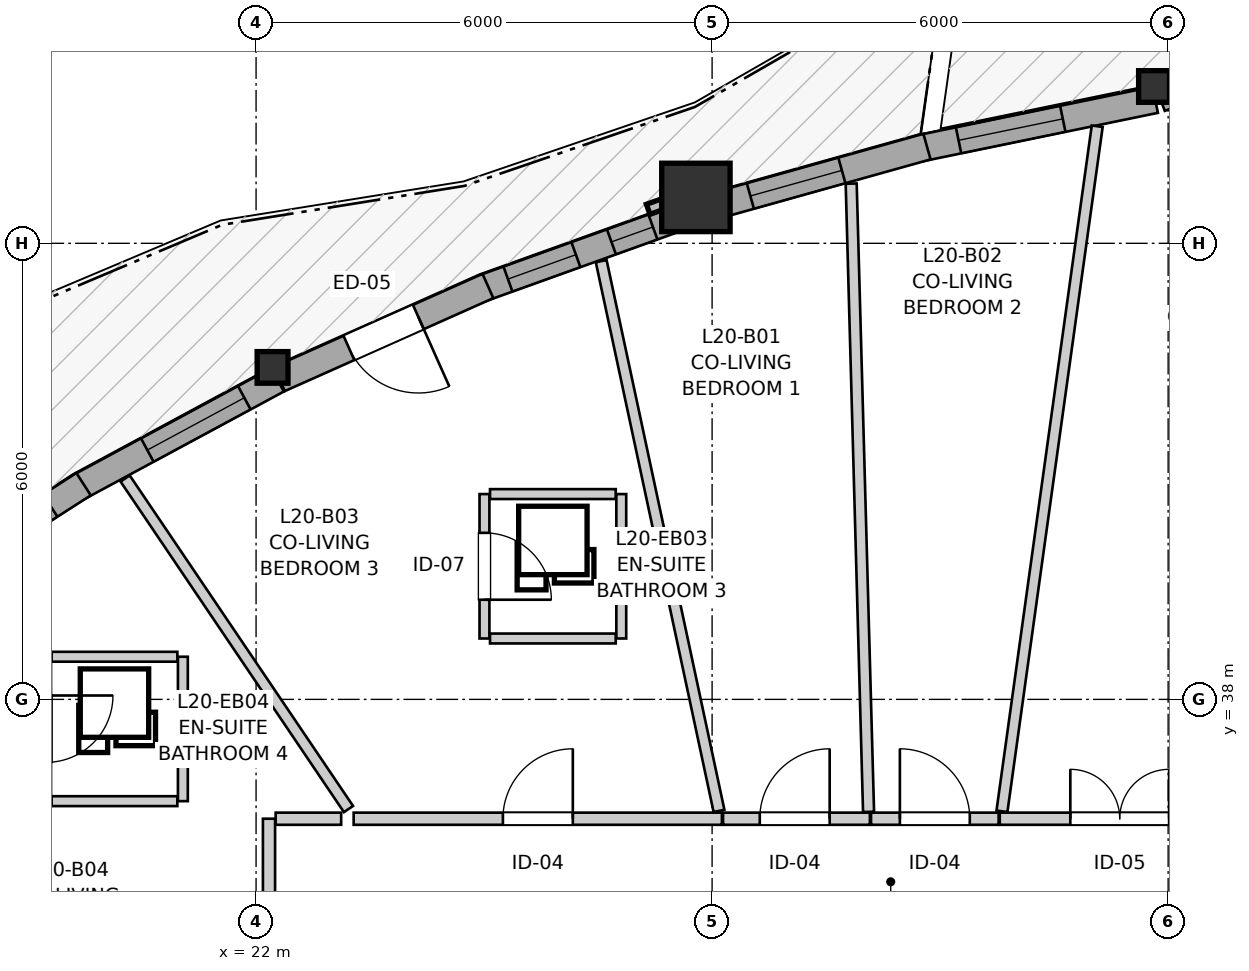
"""IFC4 building model, lengths in metres.
Left out: names, types, materials, properties, quantities, classifications, styles, units other than length and angle.
Written with IfcOpenShell. Run it as: python <this file> out.ifc"""

import sys

from ifc_helpers import new_model, si_unit, direction, frame, frame_2d, origin, origin_2d, place, context, subcontext, project, spatial, rectangle, i_section, extrude, source, transform, mapped, element, fill, save


model = new_model("IFC4")
c1 = context("Model", 3, precision=1e-05, world=origin(), true_north=direction((0.0, 1.0)))
c2 = subcontext(c1, "Body", "Model", "MODEL_VIEW")
j1 = project(units=[si_unit("LENGTHUNIT", "METRE"), si_unit("PLANEANGLEUNIT", "RADIAN")], contexts=[c1])
p1 = place(None, origin())
s1 = spatial("IfcSite", under=j1, at=p1, CompositionType="ELEMENT")
p2 = place(p1, origin())
s2 = spatial("IfcBuilding", under=s1, at=p2, CompositionType="ELEMENT")
p3 = place(p2, frame((0.0, 0.0, 70.4)))
s3 = spatial("IfcBuildingStorey", under=s2, at=p3, CompositionType="ELEMENT", Elevation=70.4)
m1 = source(origin(), c2, "Body", "SweptSolid", [
    extrude(i_section(OverallWidth=0.406, OverallDepth=0.416, WebThickness=0.027, FlangeThickness=0.044, FilletRadius=0.015, at=origin_2d()), origin(), (0.0, 0.0, 1.0), 2.95),
])
p4 = place(p3, frame((33.815, 46.063, 0.0), z_axis=(0.0, 0.0, 1.0), x_axis=(1.0, 0.0, 0.0)))
e1 = element("IfcColumn", 1, at=p4, inside=s3, PredefinedType="PILASTER", context=c2, shape_type="MappedRepresentation", body=[
    mapped(m1, transform((0.0, 0.0, 0.0), x_axis=(1.0, 0.0, 0.0), y_axis=(0.0, 1.0, 0.0), z_axis=(0.0, 0.0, 1.0), scale=1.0)),
])
m2 = source(origin(), c2, "Body", "SweptSolid", [
    extrude(rectangle(XDim=0.9, YDim=0.9, at=origin_2d()), origin(), (0.0, 0.0, 1.0), 2.95),
])
p5 = place(p3, frame((27.787, 44.604, 0.0), z_axis=(0.0, 0.0, 1.0), x_axis=(1.0, 0.0, 0.0)))
e2 = element("IfcColumn", 2, at=p5, inside=s3, PredefinedType="COLUMN", context=c2, shape_type="MappedRepresentation", body=[
    mapped(m2, transform((0.0, 0.0, 0.0), x_axis=(1.0, 0.0, 0.0), y_axis=(0.0, 1.0, 0.0), z_axis=(0.0, 0.0, 1.0), scale=1.0)),
])
p6 = place(p3, frame((22.217, 42.367, 0.0), z_axis=(0.0, 0.0, 1.0), x_axis=(1.0, 0.0, 0.0)))
e3 = element("IfcColumn", 3, at=p6, inside=s3, PredefinedType="PILASTER", context=c2, shape_type="MappedRepresentation", body=[
    mapped(m1, transform((0.0, 0.0, 0.0), x_axis=(1.0, 0.0, 0.0), y_axis=(0.0, 1.0, 0.0), z_axis=(0.0, 0.0, 1.0), scale=1.0)),
])
p7 = place(p3, frame((35.806, 46.62, 0.0), z_axis=(0.0, 0.0, 1.0), x_axis=(-0.936863987578, -0.34969396446, 0.0)))
e4 = element("IfcWall", 4, at=p7, inside=s3, PredefinedType="SOLIDWALL", context=c2, shape_type="SweptSolid", body=[
    extrude(rectangle(XDim=2.041, YDim=0.35, at=frame_2d((1.021, 0.0))), origin(), (0.0, 0.0, 1.0), 2.48),
])
p8 = place(p7, frame((0.265, 0.0, 0.82)))
e5 = element("IfcOpeningElement", 5, at=p8, cuts=e4, PredefinedType="OPENING", context=c2, shape_type="SweptSolid", body=[
    extrude(rectangle(XDim=1.45, YDim=1.25, at=frame_2d((0.725, 0.625))), frame((0.0, 0.185, 0.0), z_axis=(0.0, -1.0, 0.0), x_axis=(1.0, 0.0, 0.0)), (0.0, 0.0, 1.0), 0.37),
])
p9 = place(p3, frame((33.83, 45.888, 0.0), z_axis=(0.0, 0.0, 1.0), x_axis=(-0.979439051097, -0.201740291429, 0.0)))
e6 = element("IfcWall", 6, at=p9, inside=s3, PredefinedType="SOLIDWALL", context=c2, shape_type="SweptSolid", body=[
    extrude(rectangle(XDim=3.154, YDim=0.35, at=frame_2d((1.577, 0.0))), origin(), (0.0, 0.0, 1.0), 2.48),
])
p10 = place(p9, frame((1.242, 0.0, 0.82)))
e7 = element("IfcOpeningElement", 7, at=p10, cuts=e6, PredefinedType="OPENING", context=c2, shape_type="SweptSolid", body=[
    extrude(rectangle(XDim=1.4, YDim=1.35, at=frame_2d((0.7, 0.675))), frame((0.0, 0.185, 0.0), z_axis=(0.0, -1.0, 0.0), x_axis=(1.0, 0.0, 0.0)), (0.0, 0.0, 1.0), 0.37),
])
p11 = place(p3, frame((30.827, 45.272, 0.0), z_axis=(0.0, 0.0, 1.0), x_axis=(-0.963061576901, -0.269281263918, 0.0)))
e8 = element("IfcWall", 8, at=p11, inside=s3, PredefinedType="SOLIDWALL", context=c2, shape_type="SweptSolid", body=[
    extrude(rectangle(XDim=2.883, YDim=0.35, at=frame_2d((1.441, 0.0))), origin(), (0.0, 0.0, 1.0), 2.48),
])
p12 = place(p11, frame((1.163, 0.0, 0.82)))
e9 = element("IfcOpeningElement", 9, at=p12, cuts=e8, PredefinedType="OPENING", context=c2, shape_type="SweptSolid", body=[
    extrude(rectangle(XDim=1.25, YDim=1.35, at=frame_2d((0.625, 0.675))), frame((0.0, 0.185, 0.0), z_axis=(0.0, -1.0, 0.0), x_axis=(1.0, 0.0, 0.0)), (0.0, 0.0, 1.0), 0.37),
])
p13 = place(p3, frame((27.634, 44.363, 0.0), z_axis=(0.0, 0.0, 1.0), x_axis=(-0.941122275829, -0.3380663573, 0.0)))
e10 = element("IfcWall", 10, at=p13, inside=s3, PredefinedType="SOLIDWALL", context=c2, shape_type="SweptSolid", body=[
    extrude(rectangle(XDim=2.833, YDim=0.35, at=frame_2d((1.417, 0.0))), origin(), (0.0, 0.0, 1.0), 2.48),
])
p14 = place(p13, frame((0.439, 0.0, 0.82)))
e11 = element("IfcOpeningElement", 11, at=p14, cuts=e10, PredefinedType="OPENING", context=c2, shape_type="SweptSolid", body=[
    extrude(rectangle(XDim=0.58, YDim=1.35, at=frame_2d((0.29, 0.675))), frame((0.0, 0.185, 0.0), z_axis=(0.0, -1.0, 0.0), x_axis=(1.0, 0.0, 0.0)), (0.0, 0.0, 1.0), 0.37),
])
p15 = place(p13, frame((1.515, 0.0, 0.82)))
e12 = element("IfcOpeningElement", 12, at=p15, cuts=e10, PredefinedType="OPENING", context=c2, shape_type="SweptSolid", body=[
    extrude(rectangle(XDim=0.95, YDim=1.35, at=frame_2d((0.475, 0.675))), frame((0.0, 0.185, 0.0), z_axis=(0.0, -1.0, 0.0), x_axis=(1.0, 0.0, 0.0)), (0.0, 0.0, 1.0), 0.37),
])
p16 = place(p3, frame((25.051, 43.438, 0.0), z_axis=(0.0, 0.0, 1.0), x_axis=(-0.913435824308, -0.406982794318, 0.0)))
e13 = element("IfcWall", 13, at=p16, inside=s3, PredefinedType="SOLIDWALL", context=c2, shape_type="SweptSolid", body=[
    extrude(rectangle(XDim=3.004, YDim=0.35, at=frame_2d((1.502, 0.0))), origin(), (0.0, 0.0, 1.0), 2.48),
])
p17 = place(p16, frame((1.002, 0.0, 0.0)))
e14 = element("IfcOpeningElement", 14, at=p17, cuts=e13, PredefinedType="OPENING", context=c2, shape_type="SweptSolid", body=[
    extrude(rectangle(XDim=1.0, YDim=2.1, at=frame_2d((0.5, 1.05))), frame((0.0, 0.185, 0.0), z_axis=(0.0, -1.0, 0.0), x_axis=(1.0, 0.0, 0.0)), (0.0, 0.0, 1.0), 0.37),
])
p18 = place(p3, frame((22.282, 42.204, 0.0), z_axis=(0.0, 0.0, 1.0), x_axis=(-0.880100783756, -0.474786910553, 0.0)))
e15 = element("IfcWall", 15, at=p18, inside=s3, PredefinedType="SOLIDWALL", context=c2, shape_type="SweptSolid", body=[
    extrude(rectangle(XDim=2.987, YDim=0.35, at=frame_2d((1.494, 0.0))), origin(), (0.0, 0.0, 1.0), 2.48),
])
p19 = place(p18, frame((0.497, 0.0, 0.82)))
e16 = element("IfcOpeningElement", 16, at=p19, cuts=e15, PredefinedType="OPENING", context=c2, shape_type="SweptSolid", body=[
    extrude(rectangle(XDim=1.45, YDim=1.25, at=frame_2d((0.725, 0.625))), frame((0.0, 0.185, 0.0), z_axis=(0.0, -1.0, 0.0), x_axis=(1.0, 0.0, 0.0)), (0.0, 0.0, 1.0), 0.37),
])
p20 = place(p3, frame((19.73, 40.831, 0.0), z_axis=(0.0, 0.0, 1.0), x_axis=(-0.841577423868, -0.540136500929, 0.0)))
e17 = element("IfcWall", 17, at=p20, inside=s3, PredefinedType="SOLIDWALL", context=c2, shape_type="SweptSolid", body=[
    extrude(rectangle(XDim=2.782, YDim=0.35, at=frame_2d((1.391, 0.0))), origin(), (0.0, 0.0, 1.0), 2.48),
])
p21 = place(p20, frame((0.521, 0.0, 0.82)))
e18 = element("IfcOpeningElement", 18, at=p21, cuts=e17, PredefinedType="OPENING", context=c2, shape_type="SweptSolid", body=[
    extrude(rectangle(XDim=1.75, YDim=1.3, at=frame_2d((0.875, 0.65))), frame((0.0, 0.185, 0.0), z_axis=(0.0, -1.0, 0.0), x_axis=(1.0, 0.0, 0.0)), (0.0, 0.0, 1.0), 0.37),
])
p22 = place(p3, frame((23.284, 36.43, 0.0), z_axis=(0.0, 0.0, 1.0), x_axis=(1.0, 0.0, 0.0)))
e19 = element("IfcWall", 19, at=p22, inside=s3, PredefinedType="PARTITIONING", context=c2, shape_type="SweptSolid", body=[
    extrude(rectangle(XDim=4.845, YDim=0.16, at=frame_2d((2.422, 0.0))), origin(), (0.0, 0.0, 1.0), 2.588),
])
p23 = place(p22, frame((1.963, 0.0, 0.0)))
e20 = element("IfcOpeningElement", 20, at=p23, cuts=e19, PredefinedType="OPENING", context=c2, shape_type="SweptSolid", body=[
    extrude(rectangle(XDim=0.92, YDim=2.1, at=frame_2d((0.46, 1.05))), frame((0.0, 0.09, 0.0), z_axis=(0.0, -1.0, 0.0), x_axis=(1.0, 0.0, 0.0)), (0.0, 0.0, 1.0), 0.18),
])
p24 = place(p3, frame((22.17, 31.61, 0.0), z_axis=(0.0, 0.0, 1.0), x_axis=(0.0, 1.0, 0.0)))
e21 = element("IfcWall", 21, at=p24, inside=s3, PredefinedType="PARTITIONING", context=c2, shape_type="SweptSolid", body=[
    extrude(rectangle(XDim=4.82, YDim=0.16, at=frame_2d((2.41, 0.0))), origin(), (0.0, 0.0, 1.0), 2.95),
])
p25 = place(p24, frame((1.959, 0.0, 0.0)))
e22 = element("IfcOpeningElement", 22, at=p25, cuts=e21, PredefinedType="OPENING", context=c2, shape_type="SweptSolid", body=[
    extrude(rectangle(XDim=0.92, YDim=2.1, at=frame_2d((0.46, 1.05))), frame((0.0, 0.09, 0.0), z_axis=(0.0, -1.0, 0.0), x_axis=(1.0, 0.0, 0.0)), (0.0, 0.0, 1.0), 0.18),
])
p26 = place(p3, frame((31.785, 36.43, 0.0), z_axis=(0.0, 0.0, 1.0), x_axis=(1.0, 0.0, 0.0)))
e23 = element("IfcWall", 23, at=p26, inside=s3, PredefinedType="PARTITIONING", context=c2, shape_type="SweptSolid", body=[
    extrude(rectangle(XDim=3.109, YDim=0.16, at=frame_2d((1.555, 0.0))), origin(), (0.0, 0.0, 1.0), 2.95),
])
p27 = place(p26, frame((0.928, 0.0, 0.0)))
e24 = element("IfcOpeningElement", 24, at=p27, cuts=e23, PredefinedType="OPENING", context=c2, shape_type="SweptSolid", body=[
    extrude(rectangle(XDim=1.3, YDim=2.1, at=frame_2d((0.65, 1.05))), frame((0.0, 0.09, 0.0), z_axis=(0.0, -1.0, 0.0), x_axis=(1.0, 0.0, 0.0)), (0.0, 0.0, 1.0), 0.18),
])
p28 = place(p3, frame((28.144, 36.43, 0.0), z_axis=(0.0, 0.0, 1.0), x_axis=(1.0, 0.0, 0.0)))
e25 = element("IfcWall", 25, at=p28, inside=s3, PredefinedType="PARTITIONING", context=c2, shape_type="SweptSolid", body=[
    extrude(rectangle(XDim=1.932, YDim=0.16, at=frame_2d((0.966, 0.0))), origin(), (0.0, 0.0, 1.0), 2.95),
])
p29 = place(p28, frame((0.483, 0.0, 0.0)))
e26 = element("IfcOpeningElement", 26, at=p29, cuts=e25, PredefinedType="OPENING", context=c2, shape_type="SweptSolid", body=[
    extrude(rectangle(XDim=0.92, YDim=2.1, at=frame_2d((0.46, 1.05))), frame((0.0, 0.09, 0.0), z_axis=(0.0, -1.0, 0.0), x_axis=(1.0, 0.0, 0.0)), (0.0, 0.0, 1.0), 0.18),
])
p30 = place(p3, frame((25.005, 40.701, 0.0), z_axis=(0.0, 0.0, 1.0), x_axis=(0.0, -1.0, 0.0)))
e27 = element("IfcWall", 27, at=p30, inside=s3, PredefinedType="PARTITIONING", context=c2, shape_type="SweptSolid", body=[
    extrude(rectangle(XDim=1.9, YDim=0.13, at=frame_2d((0.95, 0.0))), origin(), (0.0, 0.0, 1.0), 2.95),
])
p31 = place(p30, frame((0.51, 0.0, 0.0)))
e28 = element("IfcOpeningElement", 28, at=p31, cuts=e27, PredefinedType="OPENING", context=c2, shape_type="SweptSolid", body=[
    extrude(rectangle(XDim=0.88, YDim=2.05, at=frame_2d((0.44, 1.025))), frame((0.0, 0.075, 0.0), z_axis=(0.0, -1.0, 0.0), x_axis=(1.0, 0.0, 0.0)), (0.0, 0.0, 1.0), 0.15),
])
p32 = place(p3, frame((30.091, 36.43, 0.0), z_axis=(0.0, 0.0, 1.0), x_axis=(1.0, 0.0, 0.0)))
e29 = element("IfcWall", 29, at=p32, inside=s3, PredefinedType="PARTITIONING", context=c2, shape_type="SweptSolid", body=[
    extrude(rectangle(XDim=1.679, YDim=0.16, at=frame_2d((0.839, 0.0))), origin(), (0.0, 0.0, 1.0), 2.95),
])
p33 = place(p32, frame((0.379, 0.0, 0.0)))
e30 = element("IfcOpeningElement", 30, at=p33, cuts=e29, PredefinedType="OPENING", context=c2, shape_type="SweptSolid", body=[
    extrude(rectangle(XDim=0.92, YDim=2.1, at=frame_2d((0.46, 1.05))), frame((0.0, 0.09, 0.0), z_axis=(0.0, -1.0, 0.0), x_axis=(1.0, 0.0, 0.0)), (0.0, 0.0, 1.0), 0.18),
])
p34 = place(p3, frame((14.527, 36.886, 0.0), z_axis=(0.0, 0.0, 1.0), x_axis=(0.823849772282, -0.566808215106, 0.0)))
e31 = element("IfcWall", 31, at=p34, inside=s3, PredefinedType="PARTITIONING", context=c2, shape_type="SweptSolid", body=[
    extrude(rectangle(XDim=9.122, YDim=0.145, at=frame_2d((4.561, 0.0))), origin(), (0.0, 0.0, 1.0), 2.95),
])
p35 = place(p3, frame((31.814, 36.528, 0.0), z_axis=(0.0, 0.0, 1.0), x_axis=(0.137724115974, 0.990470629488, 0.0)))
e32 = element("IfcWall", 32, at=p35, inside=s3, PredefinedType="PARTITIONING", context=c2, shape_type="SweptSolid", body=[
    extrude(rectangle(XDim=9.099, YDim=0.145, at=frame_2d((4.55, 0.0))), origin(), (0.0, 0.0, 1.0), 2.95),
])
p36 = place(p3, frame((29.83, 44.785, 0.0), z_axis=(0.0, 0.0, 1.0), x_axis=(0.027636759054, -0.999618031825, 0.0)))
e33 = element("IfcWall", 33, at=p36, inside=s3, PredefinedType="PARTITIONING", context=c2, shape_type="SweptSolid", body=[
    extrude(rectangle(XDim=8.269, YDim=0.145, at=frame_2d((4.134, 0.0))), origin(), (0.0, 0.0, 1.0), 2.95),
])
p37 = place(p3, frame((26.541, 43.766, 0.0), z_axis=(0.0, 0.0, 1.0), x_axis=(0.209522326513, -0.9778038631, 0.0)))
e34 = element("IfcWall", 34, at=p37, inside=s3, PredefinedType="PARTITIONING", context=c2, shape_type="SweptSolid", body=[
    extrude(rectangle(XDim=7.397, YDim=0.145, at=frame_2d((3.698, 0.0))), origin(), (0.0, 0.0, 1.0), 2.95),
])
p38 = place(p3, frame((20.277, 40.906, 0.0), z_axis=(0.0, 0.0, 1.0), x_axis=(0.559905741259, -0.828556311246, 0.0)))
e35 = element("IfcWall", 35, at=p38, inside=s3, PredefinedType="PARTITIONING", context=c2, shape_type="SweptSolid", body=[
    extrude(rectangle(XDim=5.249, YDim=0.145, at=frame_2d((2.625, 0.0))), origin(), (0.0, 0.0, 1.0), 2.95),
])
p39 = place(p3, frame((26.805, 38.801, 0.0), z_axis=(0.0, 0.0, 1.0), x_axis=(0.0, 1.0, 0.0)))
e36 = element("IfcWall", 36, at=p39, inside=s3, PredefinedType="PARTITIONING", context=c2, shape_type="SweptSolid", body=[
    extrude(rectangle(XDim=1.9, YDim=0.13, at=frame_2d((0.95, 0.0))), origin(), (0.0, 0.0, 1.0), 2.95),
])
p40 = place(p3, frame((21.037, 36.661, 0.0), z_axis=(0.0, 0.0, 1.0), x_axis=(0.0, 1.0, 0.0)))
e37 = element("IfcWall", 37, at=p40, inside=s3, PredefinedType="PARTITIONING", context=c2, shape_type="SweptSolid", body=[
    extrude(rectangle(XDim=1.9, YDim=0.13, at=frame_2d((0.95, 0.0))), origin(), (0.0, 0.0, 1.0), 2.95),
])
p41 = place(p3, frame((25.078, 40.701, 0.0), z_axis=(0.0, 0.0, 1.0), x_axis=(1.0, 0.0, 0.0)))
e38 = element("IfcWall", 38, at=p41, inside=s3, PredefinedType="PARTITIONING", context=c2, shape_type="SweptSolid", body=[
    extrude(rectangle(XDim=1.654, YDim=0.13, at=frame_2d((0.827, 0.0))), origin(), (0.0, 0.0, 1.0), 2.558),
])
for number, where, z_axis, x_axis in (
    (39, (25.078, 38.801, 0.0), (0.0, 0.0, 1.0), (1.0, 0.0, 0.0)),
    (40, (19.31, 38.561, 0.0), (0.0, 0.0, 1.0), (1.0, 0.0, 0.0)),
    (41, (19.31, 36.661, 0.0), (0.0, 0.0, 1.0), (1.0, 0.0, 0.0)),
):
    element("IfcWall", number, at=place(p3, frame(where, z_axis=z_axis, x_axis=x_axis)), inside=s3, PredefinedType="PARTITIONING", context=c2, shape_type="SweptSolid", body=[
        extrude(rectangle(XDim=1.654, YDim=0.13, at=frame_2d((0.827, 0.0))), origin(), (0.0, 0.0, 1.0), 2.95),
    ])
p42 = place(p3, frame((22.258, 36.43, 0.0), z_axis=(0.0, 0.0, 1.0), x_axis=(1.0, 0.0, 0.0)))
e42 = element("IfcWall", 42, at=p42, inside=s3, PredefinedType="PARTITIONING", context=c2, shape_type="SweptSolid", body=[
    extrude(rectangle(XDim=0.861, YDim=0.16, at=frame_2d((0.431, 0.0))), origin(), (0.0, 0.0, 1.0), 2.95),
])
m3 = source(origin(), c2, "Body", "SweptSolid", [
    extrude(rectangle(XDim=1.4, YDim=1.35, at=frame_2d((0.7, 0.675))), frame((0.0, 0.03, 0.0), z_axis=(0.0, -1.0, 0.0), x_axis=(1.0, 0.0, 0.0)), (0.0, 0.0, 1.0), 0.06),
])
p43 = place(p10, origin())
e43 = element("IfcWindow", 43, at=p43, inside=s3, PartitioningType="SINGLE_PANEL", PredefinedType="WINDOW", context=c2, shape_type="MappedRepresentation", body=[
    mapped(m3, transform((0.0, 0.0, 0.0), x_axis=(1.0, 0.0, 0.0), y_axis=(0.0, 1.0, 0.0), z_axis=(0.0, 0.0, 1.0), scale=1.0)),
])
fill(e7, e43)
m4 = source(origin(), c2, "Body", "SweptSolid", [
    extrude(rectangle(XDim=1.25, YDim=1.35, at=frame_2d((0.625, 0.675))), frame((0.0, 0.03, 0.0), z_axis=(0.0, -1.0, 0.0), x_axis=(1.0, 0.0, 0.0)), (0.0, 0.0, 1.0), 0.06),
])
p44 = place(p12, origin())
e44 = element("IfcWindow", 44, at=p44, inside=s3, PartitioningType="SINGLE_PANEL", PredefinedType="WINDOW", context=c2, shape_type="MappedRepresentation", body=[
    mapped(m4, transform((0.0, 0.0, 0.0), x_axis=(1.0, 0.0, 0.0), y_axis=(0.0, 1.0, 0.0), z_axis=(0.0, 0.0, 1.0), scale=1.0)),
])
fill(e9, e44)
m5 = source(origin(), c2, "Body", "SweptSolid", [
    extrude(rectangle(XDim=0.58, YDim=1.35, at=frame_2d((0.29, 0.675))), frame((0.0, 0.03, 0.0), z_axis=(0.0, -1.0, 0.0), x_axis=(1.0, 0.0, 0.0)), (0.0, 0.0, 1.0), 0.06),
])
p45 = place(p14, origin())
e45 = element("IfcWindow", 45, at=p45, inside=s3, PartitioningType="SINGLE_PANEL", PredefinedType="WINDOW", context=c2, shape_type="MappedRepresentation", body=[
    mapped(m5, transform((0.0, 0.0, 0.0), x_axis=(1.0, 0.0, 0.0), y_axis=(0.0, 1.0, 0.0), z_axis=(0.0, 0.0, 1.0), scale=1.0)),
])
fill(e11, e45)
m6 = source(origin(), c2, "Body", "SweptSolid", [
    extrude(rectangle(XDim=0.95, YDim=1.35, at=frame_2d((0.475, 0.675))), frame((0.0, 0.03, 0.0), z_axis=(0.0, -1.0, 0.0), x_axis=(1.0, 0.0, 0.0)), (0.0, 0.0, 1.0), 0.06),
])
p46 = place(p15, origin())
e46 = element("IfcWindow", 46, at=p46, inside=s3, PartitioningType="SINGLE_PANEL", PredefinedType="WINDOW", context=c2, shape_type="MappedRepresentation", body=[
    mapped(m6, transform((0.0, 0.0, 0.0), x_axis=(1.0, 0.0, 0.0), y_axis=(0.0, 1.0, 0.0), z_axis=(0.0, 0.0, 1.0), scale=1.0)),
])
fill(e12, e46)
m7 = source(origin(), c2, "Body", "SweptSolid", [
    extrude(rectangle(XDim=1.45, YDim=1.25, at=frame_2d((0.725, 0.625))), frame((0.0, 0.03, 0.0), z_axis=(0.0, -1.0, 0.0), x_axis=(1.0, 0.0, 0.0)), (0.0, 0.0, 1.0), 0.06),
])
p47 = place(p19, origin())
e47 = element("IfcWindow", 47, at=p47, inside=s3, PartitioningType="SINGLE_PANEL", PredefinedType="WINDOW", context=c2, shape_type="MappedRepresentation", body=[
    mapped(m7, transform((0.0, 0.0, 0.0), x_axis=(1.0, 0.0, 0.0), y_axis=(0.0, 1.0, 0.0), z_axis=(0.0, 0.0, 1.0), scale=1.0)),
])
fill(e16, e47)
m8 = source(origin(), c2, "Body", "SweptSolid", [
    extrude(rectangle(XDim=1.0, YDim=2.1, at=frame_2d((0.5, 1.05))), frame((0.0, 0.025, 0.0), z_axis=(0.0, -1.0, 0.0), x_axis=(1.0, 0.0, 0.0)), (0.0, 0.0, 1.0), 0.05),
])
p48 = place(p17, origin())
e48 = element("IfcDoor", 48, at=p48, inside=s3, OperationType="SINGLE_SWING_LEFT", PredefinedType="DOOR", context=c2, shape_type="MappedRepresentation", body=[
    mapped(m8, transform((0.0, 0.0, 0.0), x_axis=(1.0, 0.0, 0.0), y_axis=(0.0, 1.0, 0.0), z_axis=(0.0, 0.0, 1.0), scale=1.0)),
])
fill(e14, e48)
m9 = source(origin(), c2, "Body", "SweptSolid", [
    extrude(rectangle(XDim=0.92, YDim=2.1, at=frame_2d((0.46, 1.05))), frame((0.0, 0.025, 0.0), z_axis=(0.0, -1.0, 0.0), x_axis=(1.0, 0.0, 0.0)), (0.0, 0.0, 1.0), 0.05),
])
p49 = place(p23, origin())
e49 = element("IfcDoor", 49, at=p49, inside=s3, OperationType="SINGLE_SWING_RIGHT", PredefinedType="DOOR", context=c2, shape_type="MappedRepresentation", body=[
    mapped(m9, transform((0.0, 0.0, 0.0), x_axis=(1.0, 0.0, 0.0), y_axis=(0.0, 1.0, 0.0), z_axis=(0.0, 0.0, 1.0), scale=1.0)),
])
fill(e20, e49)
m10 = source(origin(), c2, "Body", "SweptSolid", [
    extrude(rectangle(XDim=1.3, YDim=2.1, at=frame_2d((0.65, 1.05))), frame((0.0, 0.025, 0.0), z_axis=(0.0, -1.0, 0.0), x_axis=(1.0, 0.0, 0.0)), (0.0, 0.0, 1.0), 0.05),
])
p50 = place(p27, origin())
e50 = element("IfcDoor", 50, at=p50, inside=s3, OperationType="DOUBLE_DOOR_SINGLE_SWING", PredefinedType="DOOR", context=c2, shape_type="MappedRepresentation", body=[
    mapped(m10, transform((0.0, 0.0, 0.0), x_axis=(1.0, 0.0, 0.0), y_axis=(0.0, 1.0, 0.0), z_axis=(0.0, 0.0, 1.0), scale=1.0)),
])
fill(e24, e50)
p51 = place(p29, origin())
e51 = element("IfcDoor", 51, at=p51, inside=s3, OperationType="SINGLE_SWING_RIGHT", PredefinedType="DOOR", context=c2, shape_type="MappedRepresentation", body=[
    mapped(m9, transform((0.0, 0.0, 0.0), x_axis=(1.0, 0.0, 0.0), y_axis=(0.0, 1.0, 0.0), z_axis=(0.0, 0.0, 1.0), scale=1.0)),
])
fill(e26, e51)
m11 = source(origin(), c2, "Body", "SweptSolid", [
    extrude(rectangle(XDim=0.88, YDim=2.05, at=frame_2d((0.44, 1.025))), frame((0.0, 0.025, 0.0), z_axis=(0.0, -1.0, 0.0), x_axis=(1.0, 0.0, 0.0)), (0.0, 0.0, 1.0), 0.05),
])
p52 = place(p31, origin())
e52 = element("IfcDoor", 52, at=p52, inside=s3, OperationType="SINGLE_SWING_RIGHT", PredefinedType="DOOR", context=c2, shape_type="MappedRepresentation", body=[
    mapped(m11, transform((0.0, 0.0, 0.0), x_axis=(1.0, 0.0, 0.0), y_axis=(0.0, 1.0, 0.0), z_axis=(0.0, 0.0, 1.0), scale=1.0)),
])
fill(e28, e52)
p53 = place(p33, origin())
e53 = element("IfcDoor", 53, at=p53, inside=s3, OperationType="SINGLE_SWING_LEFT", PredefinedType="DOOR", context=c2, shape_type="MappedRepresentation", body=[
    mapped(m9, transform((0.0, 0.0, 0.0), x_axis=(1.0, 0.0, 0.0), y_axis=(0.0, 1.0, 0.0), z_axis=(0.0, 0.0, 1.0), scale=1.0)),
])
fill(e30, e53)
save(model, sys.argv[1])
